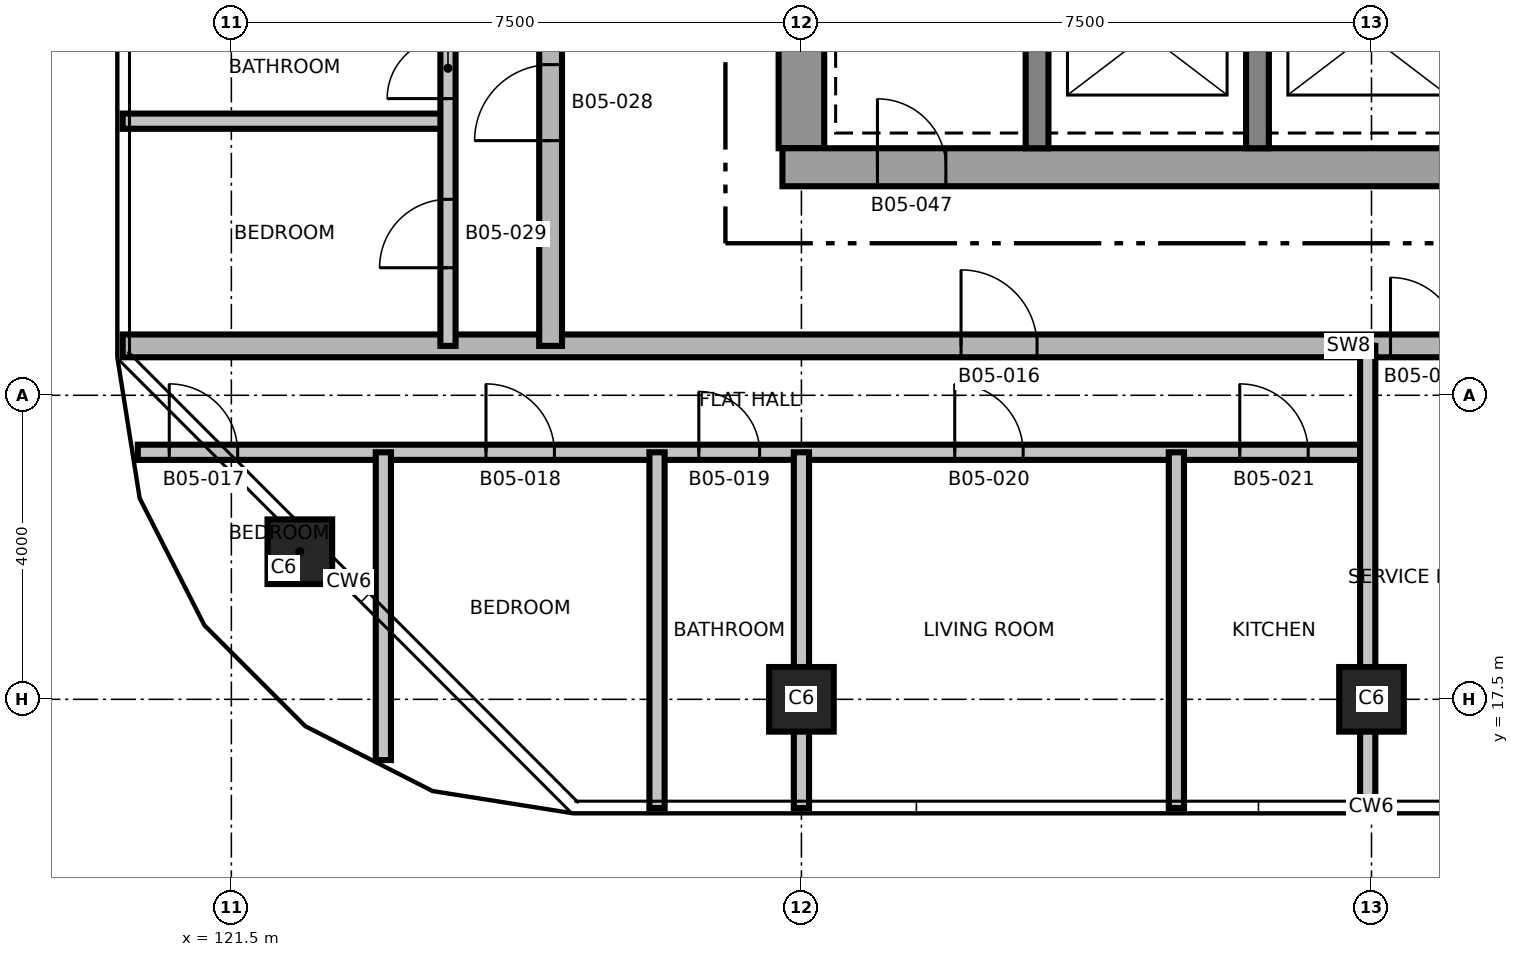
"""IFC4 building model, lengths in metres.
Left out: names, types, materials, properties, quantities, classifications, styles, units other than length and angle.
Written with IfcOpenShell. Run it as: python <this file> out.ifc"""

import sys

from ifc_helpers import new_model, si_unit, direction, frame, frame_2d, origin, origin_2d, place, context, subcontext, project, spatial, rectangle, extrude, element, fill, save


model = new_model("IFC4")
c1 = context("Model", 3, precision=1e-05, world=origin(), true_north=direction((0.0, 1.0)))
c2 = subcontext(c1, "Body", "Model", "MODEL_VIEW")
j1 = project(units=[si_unit("LENGTHUNIT", "METRE"), si_unit("PLANEANGLEUNIT", "RADIAN")], contexts=[c1])
p1 = place(None, origin())
s1 = spatial("IfcSite", under=j1, at=p1, CompositionType="ELEMENT")
p2 = place(p1, origin())
s2 = spatial("IfcBuilding", under=s1, at=p2, CompositionType="ELEMENT")
p3 = place(p2, frame((0.0, 0.0, 70.5)))
s3 = spatial("IfcBuildingStorey", under=s2, at=p3, CompositionType="ELEMENT", Elevation=70.5)
p4 = place(p3, frame((129.0, 24.75, 0.0), z_axis=(0.0, 0.0, 1.0), x_axis=(0.0, 1.0, 0.0)))
e1 = element("IfcWall", 1, at=p4, inside=s3, PredefinedType="SHEAR", context=c2, shape_type="SweptSolid", body=[
    extrude(rectangle(XDim=12.5, YDim=0.6, at=frame_2d((6.25, 0.0))), origin(), (0.0, 0.0, 1.0), 3.7),
])
p5 = place(p4, frame((5.15, 0.0, 0.0)))
e2 = element("IfcOpeningElement", 2, at=p5, cuts=e1, PredefinedType="OPENING", context=c2, shape_type="SweptSolid", body=[
    extrude(rectangle(XDim=1.0, YDim=2.1, at=frame_2d((0.5, 1.05))), frame((0.0, 0.31, 0.0), z_axis=(0.0, -1.0, 0.0), x_axis=(1.0, 0.0, 0.0)), (0.0, 0.0, 1.0), 0.62),
])
p6 = place(p3, frame((128.75, 24.5, 0.0), z_axis=(0.0, 0.0, 1.0), x_axis=(1.0, 0.0, 0.0)))
e3 = element("IfcWall", 3, at=p6, inside=s3, PredefinedType="SHEAR", context=c2, shape_type="SweptSolid", body=[
    extrude(rectangle(XDim=15.0, YDim=0.5, at=frame_2d((7.5, 0.0))), origin(), (0.0, 0.0, 1.0), 3.7),
])
p7 = place(p6, frame((9.65, 0.0, 0.0)))
e4 = element("IfcOpeningElement", 4, at=p7, cuts=e3, PredefinedType="OPENING", context=c2, shape_type="SweptSolid", body=[
    extrude(rectangle(XDim=1.5, YDim=2.1, at=frame_2d((0.75, 1.05))), frame((0.0, 0.26, 0.0), z_axis=(0.0, -1.0, 0.0), x_axis=(1.0, 0.0, 0.0)), (0.0, 0.0, 1.0), 0.52),
])
p8 = place(p6, frame((1.25, 0.0, 0.0)))
e5 = element("IfcOpeningElement", 5, at=p8, cuts=e3, PredefinedType="OPENING", context=c2, shape_type="SweptSolid", body=[
    extrude(rectangle(XDim=0.9, YDim=2.1, at=frame_2d((0.45, 1.05))), frame((0.0, 0.26, 0.0), z_axis=(0.0, -1.0, 0.0), x_axis=(1.0, 0.0, 0.0)), (0.0, 0.0, 1.0), 0.52),
])
p9 = place(p3, frame((132.1, 24.75, 0.0), z_axis=(0.0, 0.0, 1.0), x_axis=(0.0, 1.0, 0.0)))
e6 = element("IfcWall", 6, at=p9, inside=s3, PredefinedType="SHEAR", context=c2, shape_type="SweptSolid", body=[
    extrude(rectangle(XDim=12.5, YDim=0.3, at=frame_2d((6.25, 0.0))), origin(), (0.0, 0.0, 1.0), 3.7),
])
p10 = place(p9, frame((3.9, 0.0, 0.0)))
e7 = element("IfcOpeningElement", 7, at=p10, cuts=e6, PredefinedType="OPENING", context=c2, shape_type="SweptSolid", body=[
    extrude(rectangle(XDim=1.2, YDim=2.1, at=frame_2d((0.6, 1.05))), frame((0.0, 0.16, 0.0), z_axis=(0.0, -1.0, 0.0), x_axis=(1.0, 0.0, 0.0)), (0.0, 0.0, 1.0), 0.32),
])
p11 = place(p3, frame((135.0, 24.75, 0.0), z_axis=(0.0, 0.0, 1.0), x_axis=(0.0, 1.0, 0.0)))
e8 = element("IfcWall", 8, at=p11, inside=s3, PredefinedType="SHEAR", context=c2, shape_type="SweptSolid", body=[
    extrude(rectangle(XDim=2.8, YDim=0.3, at=frame_2d((1.4, 0.0))), origin(), (0.0, 0.0, 1.0), 3.7),
])
for number, where, z_axis, x_axis in (
    (9, (129.0, 17.5, 0.0), (0.0, 0.0, 1.0), (1.0, 0.0, 0.0)),
    (10, (136.5, 17.5, 0.0), (0.0, 0.0, 1.0), (1.0, 0.0, 0.0)),
    (11, (122.401, 19.442, 0.0), (0.0, 0.0, 1.0), (1.0, 0.0, 0.0)),
):
    element("IfcColumn", number, at=place(p3, frame(where, z_axis=z_axis, x_axis=x_axis)), inside=s3, PredefinedType="COLUMN", context=c2, shape_type="SweptSolid", body=[
        extrude(rectangle(XDim=0.85, YDim=0.85, at=origin_2d()), origin(), (0.0, 0.0, 1.0), 3.7),
    ])
p12 = place(p3, frame((120.269, 20.75, 0.0), z_axis=(0.0, 0.0, 1.0), x_axis=(1.0, 0.0, 0.0)))
e12 = element("IfcWall", 12, at=p12, inside=s3, PredefinedType="PARTITIONING", context=c2, shape_type="SweptSolid", body=[
    extrude(rectangle(XDim=16.231, YDim=0.2, at=frame_2d((8.115, 0.0))), origin(), (0.0, 0.0, 1.0), 3.4),
])
p13 = place(p12, frame((0.414, 0.0, 0.0)))
e13 = element("IfcOpeningElement", 13, at=p13, cuts=e12, PredefinedType="OPENING", context=c2, shape_type="SweptSolid", body=[
    extrude(rectangle(XDim=0.9, YDim=2.1, at=frame_2d((0.45, 1.05))), frame((0.0, 0.11, 0.0), z_axis=(0.0, -1.0, 0.0), x_axis=(1.0, 0.0, 0.0)), (0.0, 0.0, 1.0), 0.22),
])
p14 = place(p12, frame((4.581, 0.0, 0.0)))
e14 = element("IfcOpeningElement", 14, at=p14, cuts=e12, PredefinedType="OPENING", context=c2, shape_type="SweptSolid", body=[
    extrude(rectangle(XDim=0.9, YDim=2.1, at=frame_2d((0.45, 1.05))), frame((0.0, 0.11, 0.0), z_axis=(0.0, -1.0, 0.0), x_axis=(1.0, 0.0, 0.0)), (0.0, 0.0, 1.0), 0.22),
])
p15 = place(p12, frame((7.381, 0.0, 0.0)))
e15 = element("IfcOpeningElement", 15, at=p15, cuts=e12, PredefinedType="OPENING", context=c2, shape_type="SweptSolid", body=[
    extrude(rectangle(XDim=0.8, YDim=2.1, at=frame_2d((0.4, 1.05))), frame((0.0, 0.11, 0.0), z_axis=(0.0, -1.0, 0.0), x_axis=(1.0, 0.0, 0.0)), (0.0, 0.0, 1.0), 0.22),
])
p16 = place(p12, frame((10.748, 0.0, 0.0)))
e16 = element("IfcOpeningElement", 16, at=p16, cuts=e12, PredefinedType="OPENING", context=c2, shape_type="SweptSolid", body=[
    extrude(rectangle(XDim=0.9, YDim=2.1, at=frame_2d((0.45, 1.05))), frame((0.0, 0.11, 0.0), z_axis=(0.0, -1.0, 0.0), x_axis=(1.0, 0.0, 0.0)), (0.0, 0.0, 1.0), 0.22),
])
p17 = place(p12, frame((14.498, 0.0, 0.0)))
e17 = element("IfcOpeningElement", 17, at=p17, cuts=e12, PredefinedType="OPENING", context=c2, shape_type="SweptSolid", body=[
    extrude(rectangle(XDim=0.9, YDim=2.1, at=frame_2d((0.45, 1.05))), frame((0.0, 0.11, 0.0), z_axis=(0.0, -1.0, 0.0), x_axis=(1.0, 0.0, 0.0)), (0.0, 0.0, 1.0), 0.22),
])
p18 = place(p3, frame((120.07, 22.15, 0.0), z_axis=(0.0, 0.0, 1.0), x_axis=(1.0, 0.0, 0.0)))
e18 = element("IfcWall", 18, at=p18, inside=s3, PredefinedType="SHEAR", context=c2, shape_type="SweptSolid", body=[
    extrude(rectangle(XDim=32.86, YDim=0.3, at=frame_2d((16.43, 0.0))), origin(), (0.0, 0.0, 1.0), 3.4),
])
p19 = place(p18, frame((22.68, 0.0, 0.0)))
e19 = element("IfcOpeningElement", 19, at=p19, cuts=e18, PredefinedType="OPENING", context=c2, shape_type="SweptSolid", body=[
    extrude(rectangle(XDim=1.0, YDim=2.1, at=frame_2d((0.5, 1.05))), frame((0.0, 0.16, 0.0), z_axis=(0.0, -1.0, 0.0), x_axis=(1.0, 0.0, 0.0)), (0.0, 0.0, 1.0), 0.32),
])
p20 = place(p18, frame((11.03, 0.0, 0.0)))
e20 = element("IfcOpeningElement", 20, at=p20, cuts=e18, PredefinedType="OPENING", context=c2, shape_type="SweptSolid", body=[
    extrude(rectangle(XDim=1.0, YDim=2.1, at=frame_2d((0.5, 1.05))), frame((0.0, 0.16, 0.0), z_axis=(0.0, -1.0, 0.0), x_axis=(1.0, 0.0, 0.0)), (0.0, 0.0, 1.0), 0.32),
])
p21 = place(p18, frame((24.58, 0.0, 0.0)))
e21 = element("IfcOpeningElement", 21, at=p21, cuts=e18, PredefinedType="OPENING", context=c2, shape_type="SweptSolid", body=[
    extrude(rectangle(XDim=1.0, YDim=2.1, at=frame_2d((0.5, 1.05))), frame((0.0, 0.16, 0.0), z_axis=(0.0, -1.0, 0.0), x_axis=(1.0, 0.0, 0.0)), (0.0, 0.0, 1.0), 0.32),
])
p22 = place(p18, frame((16.68, 0.0, 0.0)))
e22 = element("IfcOpeningElement", 22, at=p22, cuts=e18, PredefinedType="OPENING", context=c2, shape_type="SweptSolid", body=[
    extrude(rectangle(XDim=0.9, YDim=2.1, at=frame_2d((0.45, 1.05))), frame((0.0, 0.16, 0.0), z_axis=(0.0, -1.0, 0.0), x_axis=(1.0, 0.0, 0.0)), (0.0, 0.0, 1.0), 0.32),
])
p23 = place(p3, frame((120.07, 25.106, 0.0), z_axis=(0.0, 0.0, 1.0), x_axis=(1.0, 0.0, 0.0)))
e23 = element("IfcWall", 23, at=p23, inside=s3, PredefinedType="PARTITIONING", context=c2, shape_type="SweptSolid", body=[
    extrude(rectangle(XDim=4.28, YDim=0.2, at=frame_2d((2.14, 0.0))), origin(), (0.0, 0.0, 1.0), 3.4),
])
p24 = place(p3, frame((123.5, 16.701, 0.0), z_axis=(0.0, 0.0, 1.0), x_axis=(0.0, 1.0, 0.0)))
e24 = element("IfcWall", 24, at=p24, inside=s3, PredefinedType="PARTITIONING", context=c2, shape_type="SweptSolid", body=[
    extrude(rectangle(XDim=4.049, YDim=0.2, at=frame_2d((2.024, 0.0))), origin(), (0.0, 0.0, 1.0), 3.4),
])
p25 = place(p3, frame((124.35, 22.15, 0.0), z_axis=(0.0, 0.0, 1.0), x_axis=(0.0, 1.0, 0.0)))
e25 = element("IfcWall", 25, at=p25, inside=s3, PredefinedType="PARTITIONING", context=c2, shape_type="SweptSolid", body=[
    extrude(rectangle(XDim=17.7, YDim=0.2, at=frame_2d((8.85, 0.0))), origin(), (0.0, 0.0, 1.0), 3.4),
])
p26 = place(p25, frame((1.028, 0.0, 0.0)))
e26 = element("IfcOpeningElement", 26, at=p26, cuts=e25, PredefinedType="OPENING", context=c2, shape_type="SweptSolid", body=[
    extrude(rectangle(XDim=0.9, YDim=2.1, at=frame_2d((0.45, 1.05))), frame((0.0, 0.11, 0.0), z_axis=(0.0, -1.0, 0.0), x_axis=(1.0, 0.0, 0.0)), (0.0, 0.0, 1.0), 0.22),
])
p27 = place(p25, frame((3.253, 0.0, 0.0)))
e27 = element("IfcOpeningElement", 27, at=p27, cuts=e25, PredefinedType="OPENING", context=c2, shape_type="SweptSolid", body=[
    extrude(rectangle(XDim=0.8, YDim=2.1, at=frame_2d((0.4, 1.05))), frame((0.0, 0.11, 0.0), z_axis=(0.0, -1.0, 0.0), x_axis=(1.0, 0.0, 0.0)), (0.0, 0.0, 1.0), 0.22),
])
p28 = place(p25, frame((6.195, 0.0, 0.0)))
e28 = element("IfcOpeningElement", 28, at=p28, cuts=e25, PredefinedType="OPENING", context=c2, shape_type="SweptSolid", body=[
    extrude(rectangle(XDim=0.9, YDim=2.1, at=frame_2d((0.45, 1.05))), frame((0.0, 0.11, 0.0), z_axis=(0.0, -1.0, 0.0), x_axis=(1.0, 0.0, 0.0)), (0.0, 0.0, 1.0), 0.22),
])
p29 = place(p25, frame((9.641, 0.0, 0.0)))
e29 = element("IfcOpeningElement", 29, at=p29, cuts=e25, PredefinedType="OPENING", context=c2, shape_type="SweptSolid", body=[
    extrude(rectangle(XDim=0.9, YDim=2.1, at=frame_2d((0.45, 1.05))), frame((0.0, 0.11, 0.0), z_axis=(0.0, -1.0, 0.0), x_axis=(1.0, 0.0, 0.0)), (0.0, 0.0, 1.0), 0.22),
])
p30 = place(p25, frame((11.895, 0.0, 0.0)))
e30 = element("IfcOpeningElement", 30, at=p30, cuts=e25, PredefinedType="OPENING", context=c2, shape_type="SweptSolid", body=[
    extrude(rectangle(XDim=0.8, YDim=2.1, at=frame_2d((0.4, 1.05))), frame((0.0, 0.11, 0.0), z_axis=(0.0, -1.0, 0.0), x_axis=(1.0, 0.0, 0.0)), (0.0, 0.0, 1.0), 0.22),
])
p31 = place(p25, frame((15.075, 0.0, 0.0)))
e31 = element("IfcOpeningElement", 31, at=p31, cuts=e25, PredefinedType="OPENING", context=c2, shape_type="SweptSolid", body=[
    extrude(rectangle(XDim=0.9, YDim=2.1, at=frame_2d((0.45, 1.05))), frame((0.0, 0.11, 0.0), z_axis=(0.0, -1.0, 0.0), x_axis=(1.0, 0.0, 0.0)), (0.0, 0.0, 1.0), 0.22),
])
p32 = place(p3, frame((125.7, 22.15, 0.0), z_axis=(0.0, 0.0, 1.0), x_axis=(0.0, 1.0, 0.0)))
e32 = element("IfcWall", 32, at=p32, inside=s3, PredefinedType="SHEAR", context=c2, shape_type="SweptSolid", body=[
    extrude(rectangle(XDim=17.7, YDim=0.3, at=frame_2d((8.85, 0.0))), origin(), (0.0, 0.0, 1.0), 3.4),
])
p33 = place(p32, frame((2.7, 0.0, 0.0)))
e33 = element("IfcOpeningElement", 33, at=p33, cuts=e32, PredefinedType="OPENING", context=c2, shape_type="SweptSolid", body=[
    extrude(rectangle(XDim=1.0, YDim=2.1, at=frame_2d((0.5, 1.05))), frame((0.0, 0.16, 0.0), z_axis=(0.0, -1.0, 0.0), x_axis=(1.0, 0.0, 0.0)), (0.0, 0.0, 1.0), 0.32),
])
for number, where, z_axis, x_axis in (
    (34, (127.1, 16.07, 0.0), (0.0, 0.0, 1.0), (0.0, 1.0, 0.0)),
    (35, (129.0, 16.07, 0.0), (0.0, 0.0, 1.0), (0.0, 1.0, 0.0)),
    (36, (133.933, 16.07, 0.0), (0.0, 0.0, 1.0), (0.0, 1.0, 0.0)),
):
    element("IfcWall", number, at=place(p3, frame(where, z_axis=z_axis, x_axis=x_axis)), inside=s3, PredefinedType="PARTITIONING", context=c2, shape_type="SweptSolid", body=[
        extrude(rectangle(XDim=4.68, YDim=0.2, at=frame_2d((2.34, 0.0))), origin(), (0.0, 0.0, 1.0), 3.4),
    ])
p34 = place(p3, frame((136.45, 16.07, 0.0), z_axis=(0.0, 0.0, 1.0), x_axis=(0.0, 1.0, 0.0)))
e37 = element("IfcWall", 37, at=p34, inside=s3, PredefinedType="PARTITIONING", context=c2, shape_type="SweptSolid", body=[
    extrude(rectangle(XDim=6.08, YDim=0.2, at=frame_2d((3.04, 0.0))), origin(), (0.0, 0.0, 1.0), 3.4),
])
p35 = place(p20, origin())
e38 = element("IfcDoor", 38, at=p35, inside=s3, OperationType="SINGLE_SWING_RIGHT", PredefinedType="DOOR", context=c2, shape_type="SweptSolid", body=[
    extrude(rectangle(XDim=1.0, YDim=2.1, at=frame_2d((0.5, 1.05))), frame((0.0, 0.025, 0.0), z_axis=(0.0, -1.0, 0.0), x_axis=(1.0, 0.0, 0.0)), (0.0, 0.0, 1.0), 0.05),
])
fill(e20, e38)
p36 = place(p13, origin())
e39 = element("IfcDoor", 39, at=p36, inside=s3, OperationType="SINGLE_SWING_LEFT", PredefinedType="DOOR", context=c2, shape_type="SweptSolid", body=[
    extrude(rectangle(XDim=0.9, YDim=2.1, at=frame_2d((0.45, 1.05))), frame((0.0, 0.025, 0.0), z_axis=(0.0, -1.0, 0.0), x_axis=(1.0, 0.0, 0.0)), (0.0, 0.0, 1.0), 0.05),
])
fill(e13, e39)
p37 = place(p14, origin())
e40 = element("IfcDoor", 40, at=p37, inside=s3, OperationType="SINGLE_SWING_RIGHT", PredefinedType="DOOR", context=c2, shape_type="SweptSolid", body=[
    extrude(rectangle(XDim=0.9, YDim=2.1, at=frame_2d((0.45, 1.05))), frame((0.0, 0.025, 0.0), z_axis=(0.0, -1.0, 0.0), x_axis=(1.0, 0.0, 0.0)), (0.0, 0.0, 1.0), 0.05),
])
fill(e14, e40)
p38 = place(p15, origin())
e41 = element("IfcDoor", 41, at=p38, inside=s3, OperationType="SINGLE_SWING_LEFT", PredefinedType="DOOR", context=c2, shape_type="SweptSolid", body=[
    extrude(rectangle(XDim=0.8, YDim=2.1, at=frame_2d((0.4, 1.05))), frame((0.0, 0.025, 0.0), z_axis=(0.0, -1.0, 0.0), x_axis=(1.0, 0.0, 0.0)), (0.0, 0.0, 1.0), 0.05),
])
fill(e15, e41)
p39 = place(p16, origin())
e42 = element("IfcDoor", 42, at=p39, inside=s3, OperationType="SINGLE_SWING_RIGHT", PredefinedType="DOOR", context=c2, shape_type="SweptSolid", body=[
    extrude(rectangle(XDim=0.9, YDim=2.1, at=frame_2d((0.45, 1.05))), frame((0.0, 0.025, 0.0), z_axis=(0.0, -1.0, 0.0), x_axis=(1.0, 0.0, 0.0)), (0.0, 0.0, 1.0), 0.05),
])
fill(e16, e42)
p40 = place(p17, origin())
e43 = element("IfcDoor", 43, at=p40, inside=s3, OperationType="SINGLE_SWING_LEFT", PredefinedType="DOOR", context=c2, shape_type="SweptSolid", body=[
    extrude(rectangle(XDim=0.9, YDim=2.1, at=frame_2d((0.45, 1.05))), frame((0.0, 0.025, 0.0), z_axis=(0.0, -1.0, 0.0), x_axis=(1.0, 0.0, 0.0)), (0.0, 0.0, 1.0), 0.05),
])
fill(e17, e43)
p41 = place(p22, origin())
e44 = element("IfcDoor", 44, at=p41, inside=s3, OperationType="SINGLE_SWING_RIGHT", PredefinedType="DOOR", context=c2, shape_type="SweptSolid", body=[
    extrude(rectangle(XDim=0.9, YDim=2.1, at=frame_2d((0.45, 1.05))), frame((0.0, 0.025, 0.0), z_axis=(0.0, -1.0, 0.0), x_axis=(1.0, 0.0, 0.0)), (0.0, 0.0, 1.0), 0.05),
])
fill(e22, e44)
p42 = place(p33, origin())
e45 = element("IfcDoor", 45, at=p42, inside=s3, OperationType="SINGLE_SWING_RIGHT", PredefinedType="DOOR", context=c2, shape_type="SweptSolid", body=[
    extrude(rectangle(XDim=1.0, YDim=2.1, at=frame_2d((0.5, 1.05))), frame((0.0, 0.025, 0.0), z_axis=(0.0, -1.0, 0.0), x_axis=(1.0, 0.0, 0.0)), (0.0, 0.0, 1.0), 0.05),
])
fill(e33, e45)
p43 = place(p26, origin())
e46 = element("IfcDoor", 46, at=p43, inside=s3, OperationType="SINGLE_SWING_LEFT", PredefinedType="DOOR", context=c2, shape_type="SweptSolid", body=[
    extrude(rectangle(XDim=0.9, YDim=2.1, at=frame_2d((0.45, 1.05))), frame((0.0, 0.025, 0.0), z_axis=(0.0, -1.0, 0.0), x_axis=(1.0, 0.0, 0.0)), (0.0, 0.0, 1.0), 0.05),
])
fill(e26, e46)
p44 = place(p27, origin())
e47 = element("IfcDoor", 47, at=p44, inside=s3, OperationType="SINGLE_SWING_RIGHT", PredefinedType="DOOR", context=c2, shape_type="SweptSolid", body=[
    extrude(rectangle(XDim=0.8, YDim=2.1, at=frame_2d((0.4, 1.05))), frame((0.0, 0.025, 0.0), z_axis=(0.0, -1.0, 0.0), x_axis=(1.0, 0.0, 0.0)), (0.0, 0.0, 1.0), 0.05),
])
fill(e27, e47)
p45 = place(p8, origin())
e48 = element("IfcDoor", 48, at=p45, inside=s3, OperationType="SINGLE_SWING_LEFT", PredefinedType="DOOR", context=c2, shape_type="SweptSolid", body=[
    extrude(rectangle(XDim=0.9, YDim=2.1, at=frame_2d((0.45, 1.05))), frame((0.0, 0.025, 0.0), z_axis=(0.0, -1.0, 0.0), x_axis=(1.0, 0.0, 0.0)), (0.0, 0.0, 1.0), 0.05),
])
fill(e5, e48)
save(model, sys.argv[1])
